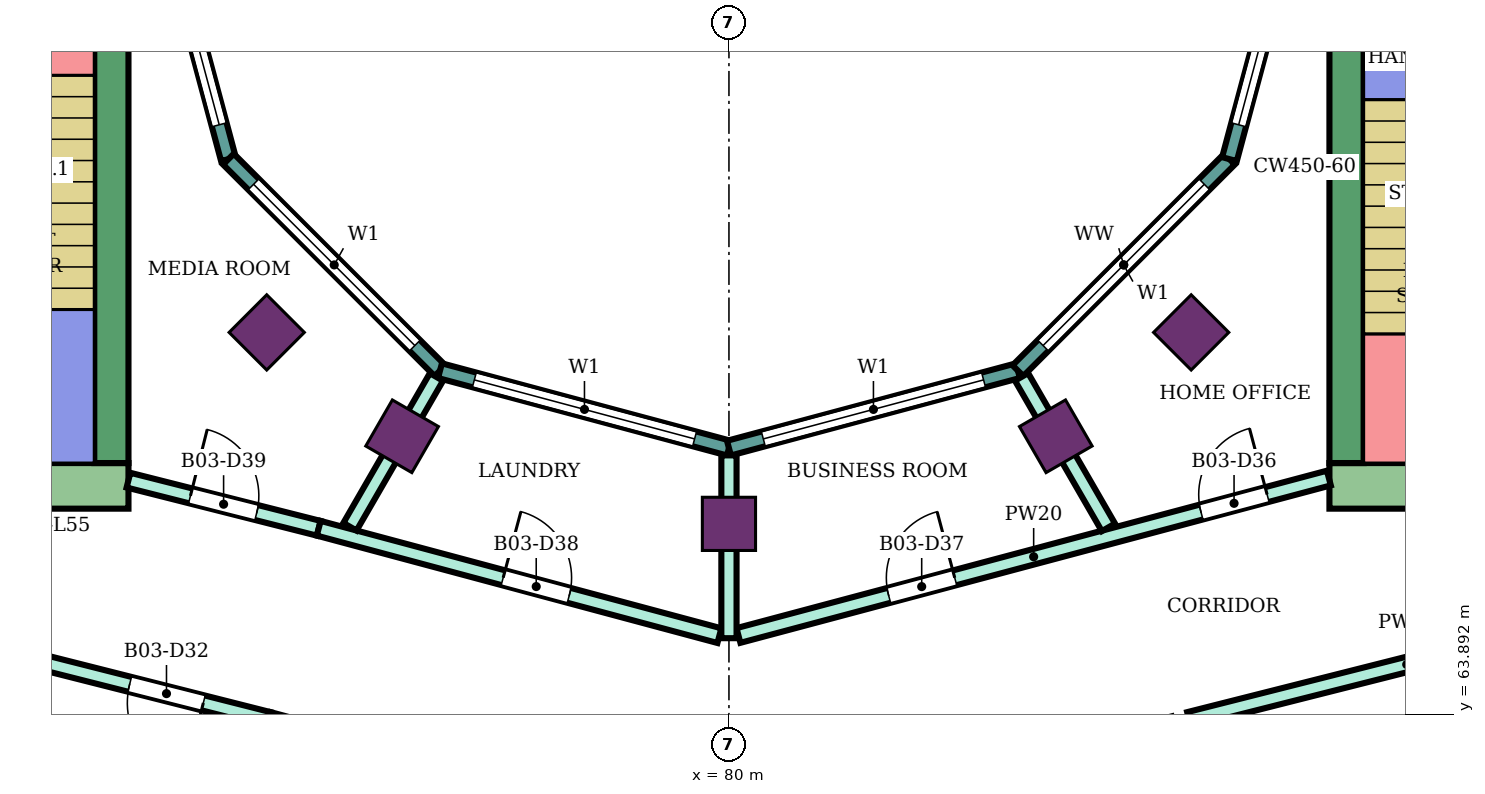
"""IFC4 building model, lengths in metres.
Left out: names, types, materials, properties, quantities, classifications, styles, units other than length and angle.
Written with IfcOpenShell. Run it as: python <this file> out.ifc"""

import sys

from ifc_helpers import new_model, si_unit, direction, frame, frame_2d, origin, origin_2d, place, context, subcontext, project, spatial, rectangle, extrude, element, fill, save


model = new_model("IFC4")
c1 = context("Model", 3, precision=1e-05, world=origin(), true_north=direction((0.0, 1.0)))
c2 = subcontext(c1, "Body", "Model", "MODEL_VIEW")
j1 = project(units=[si_unit("LENGTHUNIT", "METRE"), si_unit("PLANEANGLEUNIT", "RADIAN")], contexts=[c1])
p1 = place(None, origin())
s1 = spatial("IfcSite", under=j1, at=p1, CompositionType="ELEMENT")
p2 = place(p1, origin())
s2 = spatial("IfcBuilding", under=s1, at=p2, CompositionType="ELEMENT")
p3 = place(p2, frame((0.0, 0.0, 241.5)))
s3 = spatial("IfcBuildingStorey", under=s2, at=p3, CompositionType="ELEMENT", Elevation=241.5)
for number, where, z_axis, x_axis in (
    (1, (73.919, 68.919, 0.0), (0.0, 0.0, 1.0), (-0.707, -0.707, 0.0)),
    (2, (75.7, 67.552, 0.0), (0.0, 0.0, 1.0), (-0.5, -0.866, 0.0)),
    (3, (80.0, 66.4, 0.0), (0.0, 0.0, 1.0), (0.0, -1.0, 0.0)),
    (4, (84.3, 67.552, 0.0), (0.0, 0.0, 1.0), (0.5, -0.866, 0.0)),
    (5, (86.081, 68.919, 0.0), (0.0, 0.0, 1.0), (0.707, -0.707, 0.0)),
):
    element("IfcColumn", number, at=place(p3, frame(where, z_axis=z_axis, x_axis=x_axis)), inside=s3, PredefinedType="COLUMN", context=c2, shape_type="SweptSolid", body=[
        extrude(rectangle(XDim=0.7, YDim=0.7, at=origin_2d()), origin(), (0.0, 0.0, 1.0), 4.2),
    ])
p4 = place(p3, frame((87.9, 66.9, 0.0), z_axis=(0.0, 0.0, 1.0), x_axis=(1.0, 0.0, 0.0)))
e6 = element("IfcWall", 6, at=p4, inside=s3, PredefinedType="SHEAR", context=c2, shape_type="SweptSolid", body=[
    extrude(rectangle(XDim=14.9, YDim=0.6, at=frame_2d((7.45, 0.0))), origin(), (0.0, 0.0, 1.0), 3.88),
])
p5 = place(p4, frame((4.2, 0.0, 0.0)))
e7 = element("IfcOpeningElement", 7, at=p5, cuts=e6, PredefinedType="OPENING", context=c2, shape_type="SweptSolid", body=[
    extrude(rectangle(XDim=2.4, YDim=2.4, at=frame_2d((1.2, 1.2))), frame((0.0, 0.31, 0.0), z_axis=(0.0, -1.0, 0.0), x_axis=(1.0, 0.0, 0.0)), (0.0, 0.0, 1.0), 0.62),
])
p6 = place(p3, frame((88.125, 67.2, 0.0), z_axis=(0.0, 0.0, 1.0), x_axis=(0.0, 1.0, 0.0)))
e8 = element("IfcWall", 8, at=p6, inside=s3, PredefinedType="SHEAR", context=c2, shape_type="SweptSolid", body=[
    extrude(rectangle(XDim=7.8, YDim=0.45, at=frame_2d((3.9, 0.0))), origin(), (0.0, 0.0, 1.0), 3.88),
])
p7 = place(p3, frame((72.1, 66.9, 0.0), z_axis=(0.0, 0.0, 1.0), x_axis=(-1.0, 0.0, 0.0)))
e9 = element("IfcWall", 9, at=p7, inside=s3, PredefinedType="SHEAR", context=c2, shape_type="SweptSolid", body=[
    extrude(rectangle(XDim=14.9, YDim=0.6, at=frame_2d((7.45, 0.0))), origin(), (0.0, 0.0, 1.0), 3.88),
])
p8 = place(p7, frame((4.2, 0.0, 0.0)))
e10 = element("IfcOpeningElement", 10, at=p8, cuts=e9, PredefinedType="OPENING", context=c2, shape_type="SweptSolid", body=[
    extrude(rectangle(XDim=2.4, YDim=2.4, at=frame_2d((1.2, 1.2))), frame((0.0, 0.31, 0.0), z_axis=(0.0, -1.0, 0.0), x_axis=(1.0, 0.0, 0.0)), (0.0, 0.0, 1.0), 0.62),
])
p9 = place(p3, frame((71.875, 75.0, 0.0), z_axis=(0.0, 0.0, 1.0), x_axis=(0.0, -1.0, 0.0)))
e11 = element("IfcWall", 11, at=p9, inside=s3, PredefinedType="SHEAR", context=c2, shape_type="SweptSolid", body=[
    extrude(rectangle(XDim=7.8, YDim=0.45, at=frame_2d((3.9, 0.0))), origin(), (0.0, 0.0, 1.0), 3.88),
])
p10 = place(p3, frame((72.396, 75.0, 0.0), z_axis=(0.0, 0.0, 1.0), x_axis=(0.258789828301, -0.965933654434, 0.0)))
e12 = element("IfcWall", 12, at=p10, inside=s3, PredefinedType="NOTDEFINED", context=c2, shape_type="SweptSolid", body=[
    extrude(rectangle(XDim=3.936, YDim=0.2, at=frame_2d((1.968, 0.0))), origin(), (0.0, 0.0, 1.0), 4.2),
])
p11 = place(p10, frame((0.468, 0.0, 0.9)))
e13 = element("IfcOpeningElement", 13, at=p11, cuts=e12, PredefinedType="OPENING", context=c2, shape_type="SweptSolid", body=[
    extrude(rectangle(XDim=3.0, YDim=2.3, at=frame_2d((1.5, 1.15))), frame((0.0, 0.11, 0.0), z_axis=(0.0, -1.0, 0.0), x_axis=(1.0, 0.0, 0.0)), (0.0, 0.0, 1.0), 0.22),
])
p12 = place(p3, frame((73.415, 71.198, 0.0), z_axis=(0.0, 0.0, 1.0), x_axis=(0.707106781187, -0.707106781187, 0.0)))
e14 = element("IfcWall", 14, at=p12, inside=s3, PredefinedType="NOTDEFINED", context=c2, shape_type="SweptSolid", body=[
    extrude(rectangle(XDim=3.936, YDim=0.2, at=frame_2d((1.968, 0.0))), origin(), (0.0, 0.0, 1.0), 4.2),
])
p13 = place(p12, frame((0.468, 0.0, 0.9)))
e15 = element("IfcOpeningElement", 15, at=p13, cuts=e14, PredefinedType="OPENING", context=c2, shape_type="SweptSolid", body=[
    extrude(rectangle(XDim=3.0, YDim=2.3, at=frame_2d((1.5, 1.15))), frame((0.0, 0.11, 0.0), z_axis=(0.0, -1.0, 0.0), x_axis=(1.0, 0.0, 0.0)), (0.0, 0.0, 1.0), 0.22),
])
p14 = place(p3, frame((76.198, 68.415, 0.0), z_axis=(0.0, 0.0, 1.0), x_axis=(0.965933654434, -0.258789828301, 0.0)))
e16 = element("IfcWall", 16, at=p14, inside=s3, PredefinedType="NOTDEFINED", context=c2, shape_type="SweptSolid", body=[
    extrude(rectangle(XDim=3.936, YDim=0.2, at=frame_2d((1.968, 0.0))), origin(), (0.0, 0.0, 1.0), 4.2),
])
p15 = place(p14, frame((0.468, 0.0, 0.9)))
e17 = element("IfcOpeningElement", 17, at=p15, cuts=e16, PredefinedType="OPENING", context=c2, shape_type="SweptSolid", body=[
    extrude(rectangle(XDim=3.0, YDim=2.3, at=frame_2d((1.5, 1.15))), frame((0.0, 0.11, 0.0), z_axis=(0.0, -1.0, 0.0), x_axis=(1.0, 0.0, 0.0)), (0.0, 0.0, 1.0), 0.22),
])
p16 = place(p3, frame((80.0, 67.396, 0.0), z_axis=(0.0, 0.0, 1.0), x_axis=(0.965933654434, 0.258789828301, 0.0)))
e18 = element("IfcWall", 18, at=p16, inside=s3, PredefinedType="NOTDEFINED", context=c2, shape_type="SweptSolid", body=[
    extrude(rectangle(XDim=3.936, YDim=0.2, at=frame_2d((1.968, 0.0))), origin(), (0.0, 0.0, 1.0), 4.2),
])
p17 = place(p16, frame((0.468, 0.0, 0.9)))
e19 = element("IfcOpeningElement", 19, at=p17, cuts=e18, PredefinedType="OPENING", context=c2, shape_type="SweptSolid", body=[
    extrude(rectangle(XDim=3.0, YDim=2.3, at=frame_2d((1.5, 1.15))), frame((0.0, 0.11, 0.0), z_axis=(0.0, -1.0, 0.0), x_axis=(1.0, 0.0, 0.0)), (0.0, 0.0, 1.0), 0.22),
])
p18 = place(p3, frame((83.802, 68.415, 0.0), z_axis=(0.0, 0.0, 1.0), x_axis=(0.707106781187, 0.707106781187, 0.0)))
e20 = element("IfcWall", 20, at=p18, inside=s3, PredefinedType="NOTDEFINED", context=c2, shape_type="SweptSolid", body=[
    extrude(rectangle(XDim=3.936, YDim=0.2, at=frame_2d((1.968, 0.0))), origin(), (0.0, 0.0, 1.0), 4.2),
])
p19 = place(p18, frame((0.468, 0.0, 0.9)))
e21 = element("IfcOpeningElement", 21, at=p19, cuts=e20, PredefinedType="OPENING", context=c2, shape_type="SweptSolid", body=[
    extrude(rectangle(XDim=3.0, YDim=2.3, at=frame_2d((1.5, 1.15))), frame((0.0, 0.11, 0.0), z_axis=(0.0, -1.0, 0.0), x_axis=(1.0, 0.0, 0.0)), (0.0, 0.0, 1.0), 0.22),
])
p20 = place(p3, frame((86.585, 71.198, 0.0), z_axis=(0.0, 0.0, 1.0), x_axis=(0.258789828301, 0.965933654434, 0.0)))
e22 = element("IfcWall", 22, at=p20, inside=s3, PredefinedType="NOTDEFINED", context=c2, shape_type="SweptSolid", body=[
    extrude(rectangle(XDim=3.936, YDim=0.2, at=frame_2d((1.968, 0.0))), origin(), (0.0, 0.0, 1.0), 4.2),
])
p21 = place(p20, frame((0.468, 0.0, 0.9)))
e23 = element("IfcOpeningElement", 23, at=p21, cuts=e22, PredefinedType="OPENING", context=c2, shape_type="SweptSolid", body=[
    extrude(rectangle(XDim=3.0, YDim=2.3, at=frame_2d((1.5, 1.15))), frame((0.0, 0.11, 0.0), z_axis=(0.0, -1.0, 0.0), x_axis=(1.0, 0.0, 0.0)), (0.0, 0.0, 1.0), 0.22),
])
p22 = place(p3, frame((68.2, 65.28, 0.0), z_axis=(0.0, 0.0, 1.0), x_axis=(0.969450596516, -0.245286650503, 0.0)))
e24 = element("IfcWall", 24, at=p22, inside=s3, PredefinedType="PARTITIONING", context=c2, shape_type="SweptSolid", body=[
    extrude(rectangle(XDim=5.928, YDim=0.2, at=frame_2d((2.964, 0.0))), origin(), (0.0, 0.0, 1.0), 3.75),
])
p23 = place(p22, frame((4.039, 0.0, 0.0)))
e25 = element("IfcOpeningElement", 25, at=p23, cuts=e24, PredefinedType="OPENING", context=c2, shape_type="SweptSolid", body=[
    extrude(rectangle(XDim=1.0, YDim=2.1, at=frame_2d((0.5, 1.05))), frame((0.0, 0.11, 0.0), z_axis=(0.0, -1.0, 0.0), x_axis=(1.0, 0.0, 0.0)), (0.0, 0.0, 1.0), 0.22),
])
p24 = place(p3, frame((72.1, 66.975, 0.0), z_axis=(0.0, 0.0, 1.0), x_axis=(0.969471314457, -0.245204752086, 0.0)))
e26 = element("IfcWall", 26, at=p24, inside=s3, PredefinedType="PARTITIONING", context=c2, shape_type="SweptSolid", body=[
    extrude(rectangle(XDim=2.582, YDim=0.2, at=frame_2d((1.291, 0.0))), origin(), (0.0, 0.0, 1.0), 3.75),
])
p25 = place(p24, frame((0.841, 0.0, 0.0)))
e27 = element("IfcOpeningElement", 27, at=p25, cuts=e26, PredefinedType="OPENING", context=c2, shape_type="SweptSolid", body=[
    extrude(rectangle(XDim=0.9, YDim=2.1, at=frame_2d((0.45, 1.05))), frame((0.0, 0.11, 0.0), z_axis=(0.0, -1.0, 0.0), x_axis=(1.0, 0.0, 0.0)), (0.0, 0.0, 1.0), 0.22),
])
p26 = place(p3, frame((73.947, 63.826, 0.0), z_axis=(0.0, 0.0, 1.0), x_axis=(0.965908253407, -0.258884619088, 0.0)))
e28 = element("IfcWall", 28, at=p26, inside=s3, PredefinedType="PARTITIONING", context=c2, shape_type="SweptSolid", body=[
    extrude(rectangle(XDim=6.217, YDim=0.2, at=frame_2d((3.108, 0.0))), origin(), (0.0, 0.0, 1.0), 3.75),
])
p27 = place(p3, frame((74.603, 66.342, 0.0), z_axis=(0.0, 0.0, 1.0), x_axis=(0.965920893652, -0.258837453254, 0.0)))
e29 = element("IfcWall", 29, at=p27, inside=s3, PredefinedType="PARTITIONING", context=c2, shape_type="SweptSolid", body=[
    extrude(rectangle(XDim=5.458, YDim=0.2, at=frame_2d((2.729, 0.0))), origin(), (0.0, 0.0, 1.0), 3.75),
])
p28 = place(p27, frame((2.512, 0.0, 0.0)))
e30 = element("IfcOpeningElement", 30, at=p28, cuts=e29, PredefinedType="OPENING", context=c2, shape_type="SweptSolid", body=[
    extrude(rectangle(XDim=0.9, YDim=2.1, at=frame_2d((0.45, 1.05))), frame((0.0, 0.11, 0.0), z_axis=(0.0, -1.0, 0.0), x_axis=(1.0, 0.0, 0.0)), (0.0, 0.0, 1.0), 0.22),
])
p29 = place(p3, frame((75.014, 66.362, 0.0), z_axis=(0.0, 0.0, 1.0), x_axis=(0.500097042406, 0.865969369075, 0.0)))
e31 = element("IfcWall", 31, at=p29, inside=s3, PredefinedType="PARTITIONING", context=c2, shape_type="SweptSolid", body=[
    extrude(rectangle(XDim=2.275, YDim=0.2, at=frame_2d((1.138, 0.0))), origin(), (0.0, 0.0, 1.0), 3.75),
])
p30 = place(p3, frame((80.125, 64.932, 0.0), z_axis=(0.0, 0.0, 1.0), x_axis=(0.966236955806, 0.257655089674, 0.0)))
e32 = element("IfcWall", 32, at=p30, inside=s3, PredefinedType="PARTITIONING", context=c2, shape_type="SweptSolid", body=[
    extrude(rectangle(XDim=8.039, YDim=0.2, at=frame_2d((4.02, 0.0))), origin(), (0.0, 0.0, 1.0), 3.75),
])
p31 = place(p30, frame((6.298, 0.0, 0.0)))
e33 = element("IfcOpeningElement", 33, at=p31, cuts=e32, PredefinedType="OPENING", context=c2, shape_type="SweptSolid", body=[
    extrude(rectangle(XDim=0.9, YDim=2.1, at=frame_2d((0.45, 1.05))), frame((0.0, 0.11, 0.0), z_axis=(0.0, -1.0, 0.0), x_axis=(1.0, 0.0, 0.0)), (0.0, 0.0, 1.0), 0.22),
])
p32 = place(p30, frame((2.045, 0.0, 0.0)))
e34 = element("IfcOpeningElement", 34, at=p32, cuts=e32, PredefinedType="OPENING", context=c2, shape_type="SweptSolid", body=[
    extrude(rectangle(XDim=0.9, YDim=2.1, at=frame_2d((0.45, 1.05))), frame((0.0, 0.11, 0.0), z_axis=(0.0, -1.0, 0.0), x_axis=(1.0, 0.0, 0.0)), (0.0, 0.0, 1.0), 0.22),
])
p33 = place(p3, frame((80.0, 64.896, 0.0), z_axis=(0.0, 0.0, 1.0), x_axis=(0.0, 1.0, 0.0)))
e35 = element("IfcWall", 35, at=p33, inside=s3, PredefinedType="PARTITIONING", context=c2, shape_type="SweptSolid", body=[
    extrude(rectangle(XDim=2.405, YDim=0.2, at=frame_2d((1.203, 0.0))), origin(), (0.0, 0.0, 1.0), 3.75),
])
p34 = place(p3, frame((83.85, 68.333, 0.0), z_axis=(0.0, 0.0, 1.0), x_axis=(0.500080019051, -0.865979199835, 0.0)))
e36 = element("IfcWall", 36, at=p34, inside=s3, PredefinedType="PARTITIONING", context=c2, shape_type="SweptSolid", body=[
    extrude(rectangle(XDim=2.285, YDim=0.2, at=frame_2d((1.143, 0.0))), origin(), (0.0, 0.0, 1.0), 3.75),
])
p35 = place(p3, frame((86.053, 63.826, 0.0), z_axis=(0.0, 0.0, 1.0), x_axis=(0.969490004987, 0.245130843083, 0.0)))
e37 = element("IfcWall", 37, at=p35, inside=s3, PredefinedType="PARTITIONING", context=c2, shape_type="SweptSolid", body=[
    extrude(rectangle(XDim=5.908, YDim=0.2, at=frame_2d((2.954, 0.0))), origin(), (0.0, 0.0, 1.0), 3.75),
])
p36 = place(p11, origin())
e38 = element("IfcWindow", 38, at=p36, inside=s3, PartitioningType="SINGLE_PANEL", PredefinedType="WINDOW", context=c2, shape_type="SweptSolid", body=[
    extrude(rectangle(XDim=3.0, YDim=2.3, at=frame_2d((1.5, 1.15))), frame((0.0, 0.03, 0.0), z_axis=(0.0, -1.0, 0.0), x_axis=(1.0, 0.0, 0.0)), (0.0, 0.0, 1.0), 0.06),
])
fill(e13, e38)
p37 = place(p13, origin())
e39 = element("IfcWindow", 39, at=p37, inside=s3, PartitioningType="SINGLE_PANEL", PredefinedType="WINDOW", context=c2, shape_type="SweptSolid", body=[
    extrude(rectangle(XDim=3.0, YDim=2.3, at=frame_2d((1.5, 1.15))), frame((0.0, 0.03, 0.0), z_axis=(0.0, -1.0, 0.0), x_axis=(1.0, 0.0, 0.0)), (0.0, 0.0, 1.0), 0.06),
])
fill(e15, e39)
p38 = place(p15, origin())
e40 = element("IfcWindow", 40, at=p38, inside=s3, PartitioningType="SINGLE_PANEL", PredefinedType="WINDOW", context=c2, shape_type="SweptSolid", body=[
    extrude(rectangle(XDim=3.0, YDim=2.3, at=frame_2d((1.5, 1.15))), frame((0.0, 0.03, 0.0), z_axis=(0.0, -1.0, 0.0), x_axis=(1.0, 0.0, 0.0)), (0.0, 0.0, 1.0), 0.06),
])
fill(e17, e40)
p39 = place(p17, origin())
e41 = element("IfcWindow", 41, at=p39, inside=s3, PartitioningType="SINGLE_PANEL", PredefinedType="WINDOW", context=c2, shape_type="SweptSolid", body=[
    extrude(rectangle(XDim=3.0, YDim=2.3, at=frame_2d((1.5, 1.15))), frame((0.0, 0.03, 0.0), z_axis=(0.0, -1.0, 0.0), x_axis=(1.0, 0.0, 0.0)), (0.0, 0.0, 1.0), 0.06),
])
fill(e19, e41)
p40 = place(p19, origin())
e42 = element("IfcWindow", 42, at=p40, inside=s3, PartitioningType="SINGLE_PANEL", PredefinedType="WINDOW", context=c2, shape_type="SweptSolid", body=[
    extrude(rectangle(XDim=3.0, YDim=2.3, at=frame_2d((1.5, 1.15))), frame((0.0, 0.03, 0.0), z_axis=(0.0, -1.0, 0.0), x_axis=(1.0, 0.0, 0.0)), (0.0, 0.0, 1.0), 0.06),
])
fill(e21, e42)
p41 = place(p21, origin())
e43 = element("IfcWindow", 43, at=p41, inside=s3, PartitioningType="SINGLE_PANEL", PredefinedType="WINDOW", context=c2, shape_type="SweptSolid", body=[
    extrude(rectangle(XDim=3.0, YDim=2.3, at=frame_2d((1.5, 1.15))), frame((0.0, 0.03, 0.0), z_axis=(0.0, -1.0, 0.0), x_axis=(1.0, 0.0, 0.0)), (0.0, 0.0, 1.0), 0.06),
])
fill(e23, e43)
p42 = place(p23, frame((1.0, 0.0, 0.0), z_axis=(0.0, 0.0, 1.0), x_axis=(-1.0, 0.0, 0.0)))
e44 = element("IfcDoor", 44, at=p42, inside=s3, OperationType="SINGLE_SWING_LEFT", PredefinedType="DOOR", context=c2, shape_type="SweptSolid", body=[
    extrude(rectangle(XDim=1.0, YDim=2.1, at=frame_2d((0.5, 1.05))), frame((0.0, 0.025, 0.0), z_axis=(0.0, -1.0, 0.0), x_axis=(1.0, 0.0, 0.0)), (0.0, 0.0, 1.0), 0.05),
])
fill(e25, e44)
p43 = place(p31, origin())
e45 = element("IfcDoor", 45, at=p43, inside=s3, OperationType="SINGLE_SWING_RIGHT", PredefinedType="DOOR", context=c2, shape_type="SweptSolid", body=[
    extrude(rectangle(XDim=0.9, YDim=2.1, at=frame_2d((0.45, 1.05))), frame((0.0, 0.025, 0.0), z_axis=(0.0, -1.0, 0.0), x_axis=(1.0, 0.0, 0.0)), (0.0, 0.0, 1.0), 0.05),
])
fill(e33, e45)
p44 = place(p32, origin())
e46 = element("IfcDoor", 46, at=p44, inside=s3, OperationType="SINGLE_SWING_RIGHT", PredefinedType="DOOR", context=c2, shape_type="SweptSolid", body=[
    extrude(rectangle(XDim=0.9, YDim=2.1, at=frame_2d((0.45, 1.05))), frame((0.0, 0.025, 0.0), z_axis=(0.0, -1.0, 0.0), x_axis=(1.0, 0.0, 0.0)), (0.0, 0.0, 1.0), 0.05),
])
fill(e34, e46)
p45 = place(p28, origin())
e47 = element("IfcDoor", 47, at=p45, inside=s3, OperationType="SINGLE_SWING_LEFT", PredefinedType="DOOR", context=c2, shape_type="SweptSolid", body=[
    extrude(rectangle(XDim=0.9, YDim=2.1, at=frame_2d((0.45, 1.05))), frame((0.0, 0.025, 0.0), z_axis=(0.0, -1.0, 0.0), x_axis=(1.0, 0.0, 0.0)), (0.0, 0.0, 1.0), 0.05),
])
fill(e30, e47)
p46 = place(p25, origin())
e48 = element("IfcDoor", 48, at=p46, inside=s3, OperationType="SINGLE_SWING_LEFT", PredefinedType="DOOR", context=c2, shape_type="SweptSolid", body=[
    extrude(rectangle(XDim=0.9, YDim=2.1, at=frame_2d((0.45, 1.05))), frame((0.0, 0.025, 0.0), z_axis=(0.0, -1.0, 0.0), x_axis=(1.0, 0.0, 0.0)), (0.0, 0.0, 1.0), 0.05),
])
fill(e27, e48)
save(model, sys.argv[1])
